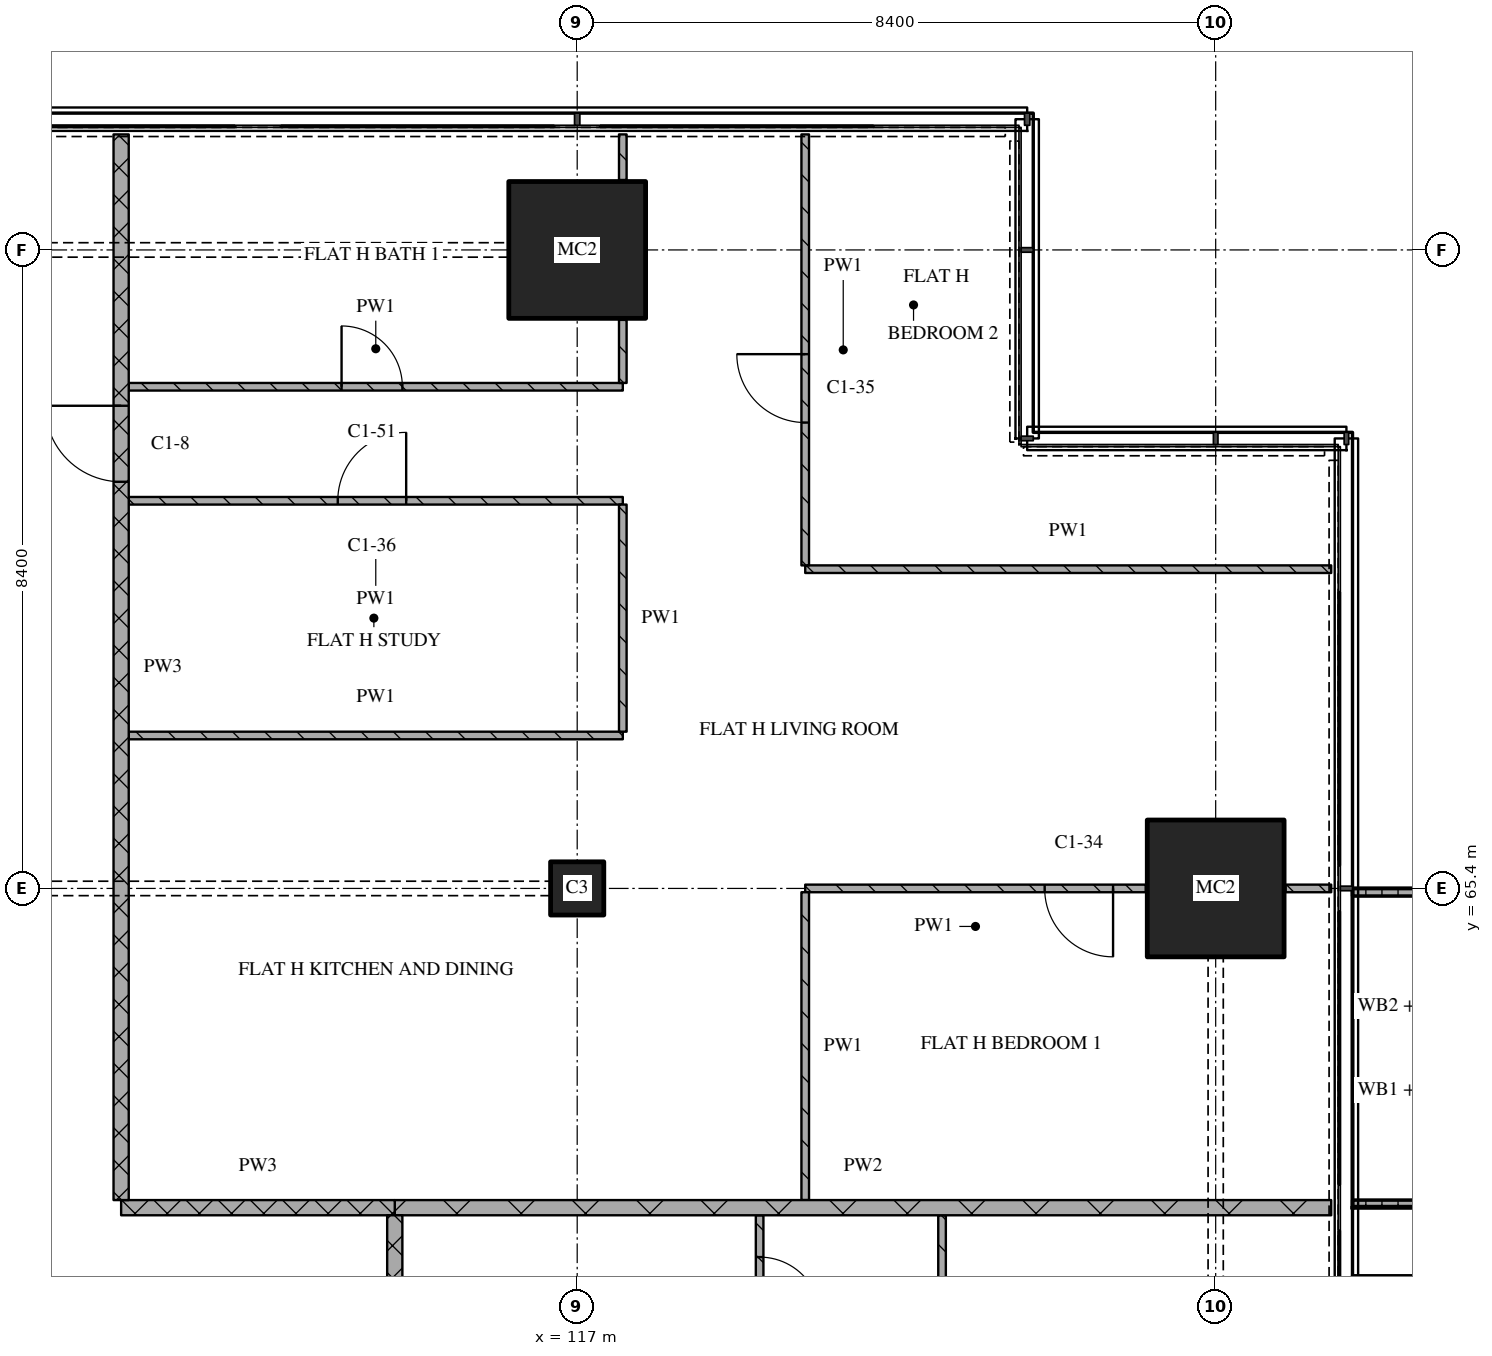
"""IFC4 building model, lengths in metres.
Left out: names, types, materials, properties, quantities, classifications, styles, units other than length and angle.
Written with IfcOpenShell. Run it as: python <this file> out.ifc"""

import sys

from ifc_helpers import new_model, si_unit, direction, frame, frame_2d, origin, origin_2d, place, context, subcontext, project, spatial, polyline, rectangle, outline, extrude, element, fill, save


model = new_model("IFC4")
c1 = context("Model", 3, precision=1e-05, world=origin(), true_north=direction((0.0, 1.0)))
c2 = subcontext(c1, "Body", "Model", "MODEL_VIEW")
j1 = project(units=[si_unit("LENGTHUNIT", "METRE"), si_unit("PLANEANGLEUNIT", "RADIAN")], contexts=[c1])
p1 = place(None, origin())
s1 = spatial("IfcSite", under=j1, at=p1, CompositionType="ELEMENT")
p2 = place(p1, origin())
s2 = spatial("IfcBuilding", under=s1, at=p2, CompositionType="ELEMENT")
p3 = place(p2, frame((0.0, 0.0, 151.05)))
s3 = spatial("IfcBuildingStorey", under=s2, at=p3, CompositionType="ELEMENT", Elevation=151.05)
p4 = place(p3, frame((117.0, 65.4, 0.0), z_axis=(0.0, 0.0, 1.0), x_axis=(1.0, 0.0, 0.0)))
e1 = element("IfcColumn", 1, at=p4, inside=s3, PredefinedType="COLUMN", context=c2, shape_type="SweptSolid", body=[
    extrude(rectangle(XDim=0.7, YDim=0.7, at=origin_2d()), origin(), (0.0, 0.0, 1.0), 3.6),
])
for number, where, z_axis, x_axis in (
    (2, (117.0, 73.8, 0.0), (0.0, 0.0, 1.0), (1.0, 0.0, 0.0)),
    (3, (125.4, 65.4, 0.0), (0.0, 0.0, 1.0), (1.0, 0.0, 0.0)),
):
    element("IfcColumn", number, at=place(p3, frame(where, z_axis=z_axis, x_axis=x_axis)), inside=s3, PredefinedType="COLUMN", context=c2, shape_type="SweptSolid", body=[
        extrude(rectangle(XDim=1.8, YDim=1.8, at=origin_2d()), origin(), (0.0, 0.0, 1.0), 3.6),
    ])
p5 = place(p3, origin())
e4 = element("IfcWall", 4, at=p5, inside=s3, PredefinedType="SOLIDWALL", context=c2, shape_type="SweptSolid", body=[
    extrude(outline(polyline([(127.2, 61.2), (127.2, 61.3), (128.833, 61.3), (128.833, 65.3), (127.2, 65.3), (127.2, 65.4), (128.933, 65.4), (128.933, 61.2), (127.2, 61.2)])), origin(), (0.0, 0.0, 1.0), 1.0),
])
p6 = place(p3, frame((111.0, 61.2, 0.0), z_axis=(0.0, 0.0, 1.0), x_axis=(1.0, 0.0, 0.0)))
e5 = element("IfcWall", 5, at=p6, inside=s3, PredefinedType="PARTITIONING", context=c2, shape_type="SweptSolid", body=[
    extrude(rectangle(XDim=3.6, YDim=0.2, at=frame_2d((1.8, 0.0))), origin(), (0.0, 0.0, 1.0), 3.32),
])
p7 = place(p3, frame((114.6, 61.2, 0.0), z_axis=(0.0, 0.0, 1.0), x_axis=(1.0, 0.0, 0.0)))
e6 = element("IfcWall", 6, at=p7, inside=s3, PredefinedType="PARTITIONING", context=c2, shape_type="SweptSolid", body=[
    extrude(rectangle(XDim=12.32, YDim=0.2, at=frame_2d((6.16, 0.0))), origin(), (0.0, 0.0, 1.0), 3.32),
])
p8 = place(p3, frame((124.48, 65.4, 0.0), z_axis=(0.0, 0.0, 1.0), x_axis=(-1.0, 0.0, 0.0)))
e7 = element("IfcWall", 7, at=p8, inside=s3, PredefinedType="PARTITIONING", context=c2, shape_type="SweptSolid", body=[
    extrude(rectangle(XDim=4.48, YDim=0.1, at=frame_2d((2.24, 0.0))), origin(), (0.0, 0.0, 1.0), 3.32),
])
p9 = place(p8, frame((0.43, 0.0, 0.0)))
e8 = element("IfcOpeningElement", 8, at=p9, cuts=e7, PredefinedType="OPENING", context=c2, shape_type="SweptSolid", body=[
    extrude(rectangle(XDim=0.9, YDim=2.1, at=frame_2d((0.45, 1.05))), frame((0.0, 0.06, 0.0), z_axis=(0.0, -1.0, 0.0), x_axis=(1.0, 0.0, 0.0)), (0.0, 0.0, 1.0), 0.12),
])
p10 = place(p3, frame((126.32, 65.4, 0.0), z_axis=(0.0, 0.0, 1.0), x_axis=(1.0, 0.0, 0.0)))
e9 = element("IfcWall", 9, at=p10, inside=s3, PredefinedType="PARTITIONING", context=c2, shape_type="SweptSolid", body=[
    extrude(rectangle(XDim=0.6, YDim=0.1, at=frame_2d((0.3, 0.0))), origin(), (0.0, 0.0, 1.0), 3.32),
])
p11 = place(p3, frame((111.1, 67.412, 0.0), z_axis=(0.0, 0.0, 1.0), x_axis=(1.0, 0.0, 0.0)))
e10 = element("IfcWall", 10, at=p11, inside=s3, PredefinedType="PARTITIONING", context=c2, shape_type="SweptSolid", body=[
    extrude(rectangle(XDim=6.5, YDim=0.1, at=frame_2d((3.25, 0.0))), origin(), (0.0, 0.0, 1.0), 3.32),
])
p12 = place(p3, frame((120.0, 69.6, 0.0), z_axis=(0.0, 0.0, 1.0), x_axis=(1.0, 0.0, 0.0)))
e11 = element("IfcWall", 11, at=p12, inside=s3, PredefinedType="PARTITIONING", context=c2, shape_type="SweptSolid", body=[
    extrude(rectangle(XDim=6.92, YDim=0.1, at=frame_2d((3.46, 0.0))), origin(), (0.0, 0.0, 1.0), 3.32),
])
p13 = place(p3, frame((117.6, 70.5, 0.0), z_axis=(0.0, 0.0, 1.0), x_axis=(-1.0, 0.0, 0.0)))
e12 = element("IfcWall", 12, at=p13, inside=s3, PredefinedType="PARTITIONING", context=c2, shape_type="SweptSolid", body=[
    extrude(rectangle(XDim=6.5, YDim=0.1, at=frame_2d((3.25, 0.0))), origin(), (0.0, 0.0, 1.0), 3.32),
])
p14 = place(p13, frame((2.85, 0.0, 0.0)))
e13 = element("IfcOpeningElement", 13, at=p14, cuts=e12, PredefinedType="OPENING", context=c2, shape_type="SweptSolid", body=[
    extrude(rectangle(XDim=0.9, YDim=2.1, at=frame_2d((0.45, 1.05))), frame((0.0, 0.06, 0.0), z_axis=(0.0, -1.0, 0.0), x_axis=(1.0, 0.0, 0.0)), (0.0, 0.0, 1.0), 0.12),
])
p15 = place(p3, frame((111.1, 72.0, 0.0), z_axis=(0.0, 0.0, 1.0), x_axis=(1.0, 0.0, 0.0)))
e14 = element("IfcWall", 14, at=p15, inside=s3, PredefinedType="PARTITIONING", context=c2, shape_type="SweptSolid", body=[
    extrude(rectangle(XDim=6.5, YDim=0.1, at=frame_2d((3.25, 0.0))), origin(), (0.0, 0.0, 1.0), 3.32),
])
p16 = place(p15, frame((2.8, 0.0, 0.0)))
e15 = element("IfcOpeningElement", 15, at=p16, cuts=e14, PredefinedType="OPENING", context=c2, shape_type="SweptSolid", body=[
    extrude(rectangle(XDim=0.8, YDim=2.1, at=frame_2d((0.4, 1.05))), frame((0.0, 0.06, 0.0), z_axis=(0.0, -1.0, 0.0), x_axis=(1.0, 0.0, 0.0)), (0.0, 0.0, 1.0), 0.12),
])
p17 = place(p3, frame((111.0, 75.32, 0.0), z_axis=(0.0, 0.0, 1.0), x_axis=(0.0, -1.0, 0.0)))
e16 = element("IfcWall", 16, at=p17, inside=s3, PredefinedType="PARTITIONING", context=c2, shape_type="SweptSolid", body=[
    extrude(rectangle(XDim=14.02, YDim=0.2, at=frame_2d((7.01, 0.0))), origin(), (0.0, 0.0, 1.0), 3.32),
])
p18 = place(p17, frame((3.57, 0.0, 0.0)))
e17 = element("IfcOpeningElement", 17, at=p18, cuts=e16, PredefinedType="OPENING", context=c2, shape_type="SweptSolid", body=[
    extrude(rectangle(XDim=1.0, YDim=2.1, at=frame_2d((0.5, 1.05))), frame((0.0, 0.11, 0.0), z_axis=(0.0, -1.0, 0.0), x_axis=(1.0, 0.0, 0.0)), (0.0, 0.0, 1.0), 0.22),
])
p19 = place(p3, frame((114.6, 61.1, 0.0), z_axis=(0.0, 0.0, 1.0), x_axis=(0.0, -1.0, 0.0)))
e18 = element("IfcWall", 18, at=p19, inside=s3, PredefinedType="PARTITIONING", context=c2, shape_type="SweptSolid", body=[
    extrude(rectangle(XDim=17.8, YDim=0.2, at=frame_2d((8.9, 0.0))), origin(), (0.0, 0.0, 1.0), 3.32),
])
p20 = place(p19, frame((4.65, 0.0, 0.0)))
e19 = element("IfcOpeningElement", 19, at=p20, cuts=e18, PredefinedType="OPENING", context=c2, shape_type="SweptSolid", body=[
    extrude(rectangle(XDim=1.0, YDim=2.1, at=frame_2d((0.5, 1.05))), frame((0.0, 0.11, 0.0), z_axis=(0.0, -1.0, 0.0), x_axis=(1.0, 0.0, 0.0)), (0.0, 0.0, 1.0), 0.22),
])
p21 = place(p3, frame((117.6, 70.45, 0.0), z_axis=(0.0, 0.0, 1.0), x_axis=(0.0, -1.0, 0.0)))
e20 = element("IfcWall", 20, at=p21, inside=s3, PredefinedType="PARTITIONING", context=c2, shape_type="SweptSolid", body=[
    extrude(rectangle(XDim=2.988, YDim=0.1, at=frame_2d((1.494, 0.0))), origin(), (0.0, 0.0, 1.0), 3.32),
])
p22 = place(p3, frame((117.6, 72.88, 0.0), z_axis=(0.0, 0.0, 1.0), x_axis=(0.0, -1.0, 0.0)))
e21 = element("IfcWall", 21, at=p22, inside=s3, PredefinedType="PARTITIONING", context=c2, shape_type="SweptSolid", body=[
    extrude(rectangle(XDim=0.83, YDim=0.1, at=frame_2d((0.415, 0.0))), origin(), (0.0, 0.0, 1.0), 3.32),
])
p23 = place(p3, frame((117.6, 75.32, 0.0), z_axis=(0.0, 0.0, 1.0), x_axis=(0.0, -1.0, 0.0)))
e22 = element("IfcWall", 22, at=p23, inside=s3, PredefinedType="PARTITIONING", context=c2, shape_type="SweptSolid", body=[
    extrude(rectangle(XDim=0.6, YDim=0.1, at=frame_2d((0.3, 0.0))), origin(), (0.0, 0.0, 1.0), 3.32),
])
p24 = place(p3, frame((119.4, 56.75, 0.0), z_axis=(0.0, 0.0, 1.0), x_axis=(0.0, 1.0, 0.0)))
e23 = element("IfcWall", 23, at=p24, inside=s3, PredefinedType="PARTITIONING", context=c2, shape_type="SweptSolid", body=[
    extrude(rectangle(XDim=4.35, YDim=0.1, at=frame_2d((2.175, 0.0))), origin(), (0.0, 0.0, 1.0), 3.32),
])
p25 = place(p24, frame((3.0, 0.0, 0.0)))
e24 = element("IfcOpeningElement", 24, at=p25, cuts=e23, PredefinedType="OPENING", context=c2, shape_type="SweptSolid", body=[
    extrude(rectangle(XDim=0.8, YDim=2.1, at=frame_2d((0.4, 1.05))), frame((0.0, 0.06, 0.0), z_axis=(0.0, -1.0, 0.0), x_axis=(1.0, 0.0, 0.0)), (0.0, 0.0, 1.0), 0.12),
])
p26 = place(p3, frame((120.0, 65.35, 0.0), z_axis=(0.0, 0.0, 1.0), x_axis=(0.0, -1.0, 0.0)))
e25 = element("IfcWall", 25, at=p26, inside=s3, PredefinedType="PARTITIONING", context=c2, shape_type="SweptSolid", body=[
    extrude(rectangle(XDim=4.05, YDim=0.1, at=frame_2d((2.025, 0.0))), origin(), (0.0, 0.0, 1.0), 3.32),
])
p27 = place(p3, frame((120.0, 75.32, 0.0), z_axis=(0.0, 0.0, 1.0), x_axis=(0.0, -1.0, 0.0)))
e26 = element("IfcWall", 26, at=p27, inside=s3, PredefinedType="PARTITIONING", context=c2, shape_type="SweptSolid", body=[
    extrude(rectangle(XDim=5.67, YDim=0.1, at=frame_2d((2.835, 0.0))), origin(), (0.0, 0.0, 1.0), 3.32),
])
p28 = place(p27, frame((2.891, 0.0, 0.0)))
e27 = element("IfcOpeningElement", 27, at=p28, cuts=e26, PredefinedType="OPENING", context=c2, shape_type="SweptSolid", body=[
    extrude(rectangle(XDim=0.9, YDim=2.1, at=frame_2d((0.45, 1.05))), frame((0.0, 0.06, 0.0), z_axis=(0.0, -1.0, 0.0), x_axis=(1.0, 0.0, 0.0)), (0.0, 0.0, 1.0), 0.12),
])
p29 = place(p3, frame((121.8, 61.1, 0.0), z_axis=(0.0, 0.0, 1.0), x_axis=(0.0, -1.0, 0.0)))
e28 = element("IfcWall", 28, at=p29, inside=s3, PredefinedType="PARTITIONING", context=c2, shape_type="SweptSolid", body=[
    extrude(rectangle(XDim=8.25, YDim=0.1, at=frame_2d((4.125, 0.0))), origin(), (0.0, 0.0, 1.0), 3.32),
])
p30 = place(p29, frame((3.65, 0.0, 0.0)))
e29 = element("IfcOpeningElement", 29, at=p30, cuts=e28, PredefinedType="OPENING", context=c2, shape_type="SweptSolid", body=[
    extrude(rectangle(XDim=0.9, YDim=2.1, at=frame_2d((0.45, 1.05))), frame((0.0, 0.06, 0.0), z_axis=(0.0, -1.0, 0.0), x_axis=(1.0, 0.0, 0.0)), (0.0, 0.0, 1.0), 0.12),
])
p31 = place(p9, origin())
e30 = element("IfcDoor", 30, at=p31, inside=s3, OperationType="SINGLE_SWING_LEFT", PredefinedType="DOOR", context=c2, shape_type="SweptSolid", body=[
    extrude(rectangle(XDim=0.9, YDim=2.1, at=frame_2d((0.45, 1.05))), frame((0.0, 0.025, 0.0), z_axis=(0.0, -1.0, 0.0), x_axis=(1.0, 0.0, 0.0)), (0.0, 0.0, 1.0), 0.05),
])
fill(e8, e30)
p32 = place(p14, origin())
e31 = element("IfcDoor", 31, at=p32, inside=s3, OperationType="SINGLE_SWING_RIGHT", PredefinedType="DOOR", context=c2, shape_type="SweptSolid", body=[
    extrude(rectangle(XDim=0.9, YDim=2.1, at=frame_2d((0.45, 1.05))), frame((0.0, 0.025, 0.0), z_axis=(0.0, -1.0, 0.0), x_axis=(1.0, 0.0, 0.0)), (0.0, 0.0, 1.0), 0.05),
])
fill(e13, e31)
p33 = place(p16, origin())
e32 = element("IfcDoor", 32, at=p33, inside=s3, OperationType="SINGLE_SWING_LEFT", PredefinedType="DOOR", context=c2, shape_type="SweptSolid", body=[
    extrude(rectangle(XDim=0.8, YDim=2.1, at=frame_2d((0.4, 1.05))), frame((0.0, 0.025, 0.0), z_axis=(0.0, -1.0, 0.0), x_axis=(1.0, 0.0, 0.0)), (0.0, 0.0, 1.0), 0.05),
])
fill(e15, e32)
p34 = place(p18, origin())
e33 = element("IfcDoor", 33, at=p34, inside=s3, OperationType="SINGLE_SWING_RIGHT", PredefinedType="DOOR", context=c2, shape_type="SweptSolid", body=[
    extrude(rectangle(XDim=1.0, YDim=2.1, at=frame_2d((0.5, 1.05))), frame((0.0, 0.025, 0.0), z_axis=(0.0, -1.0, 0.0), x_axis=(1.0, 0.0, 0.0)), (0.0, 0.0, 1.0), 0.05),
])
fill(e17, e33)
p35 = place(p25, origin())
e34 = element("IfcDoor", 34, at=p35, inside=s3, OperationType="SINGLE_SWING_RIGHT", PredefinedType="DOOR", context=c2, shape_type="SweptSolid", body=[
    extrude(rectangle(XDim=0.8, YDim=2.1, at=frame_2d((0.4, 1.05))), frame((0.0, 0.025, 0.0), z_axis=(0.0, -1.0, 0.0), x_axis=(1.0, 0.0, 0.0)), (0.0, 0.0, 1.0), 0.05),
])
fill(e24, e34)
p36 = place(p28, origin())
e35 = element("IfcDoor", 35, at=p36, inside=s3, OperationType="SINGLE_SWING_RIGHT", PredefinedType="DOOR", context=c2, shape_type="SweptSolid", body=[
    extrude(rectangle(XDim=0.9, YDim=2.1, at=frame_2d((0.45, 1.05))), frame((0.0, 0.025, 0.0), z_axis=(0.0, -1.0, 0.0), x_axis=(1.0, 0.0, 0.0)), (0.0, 0.0, 1.0), 0.05),
])
fill(e27, e35)
save(model, sys.argv[1])
